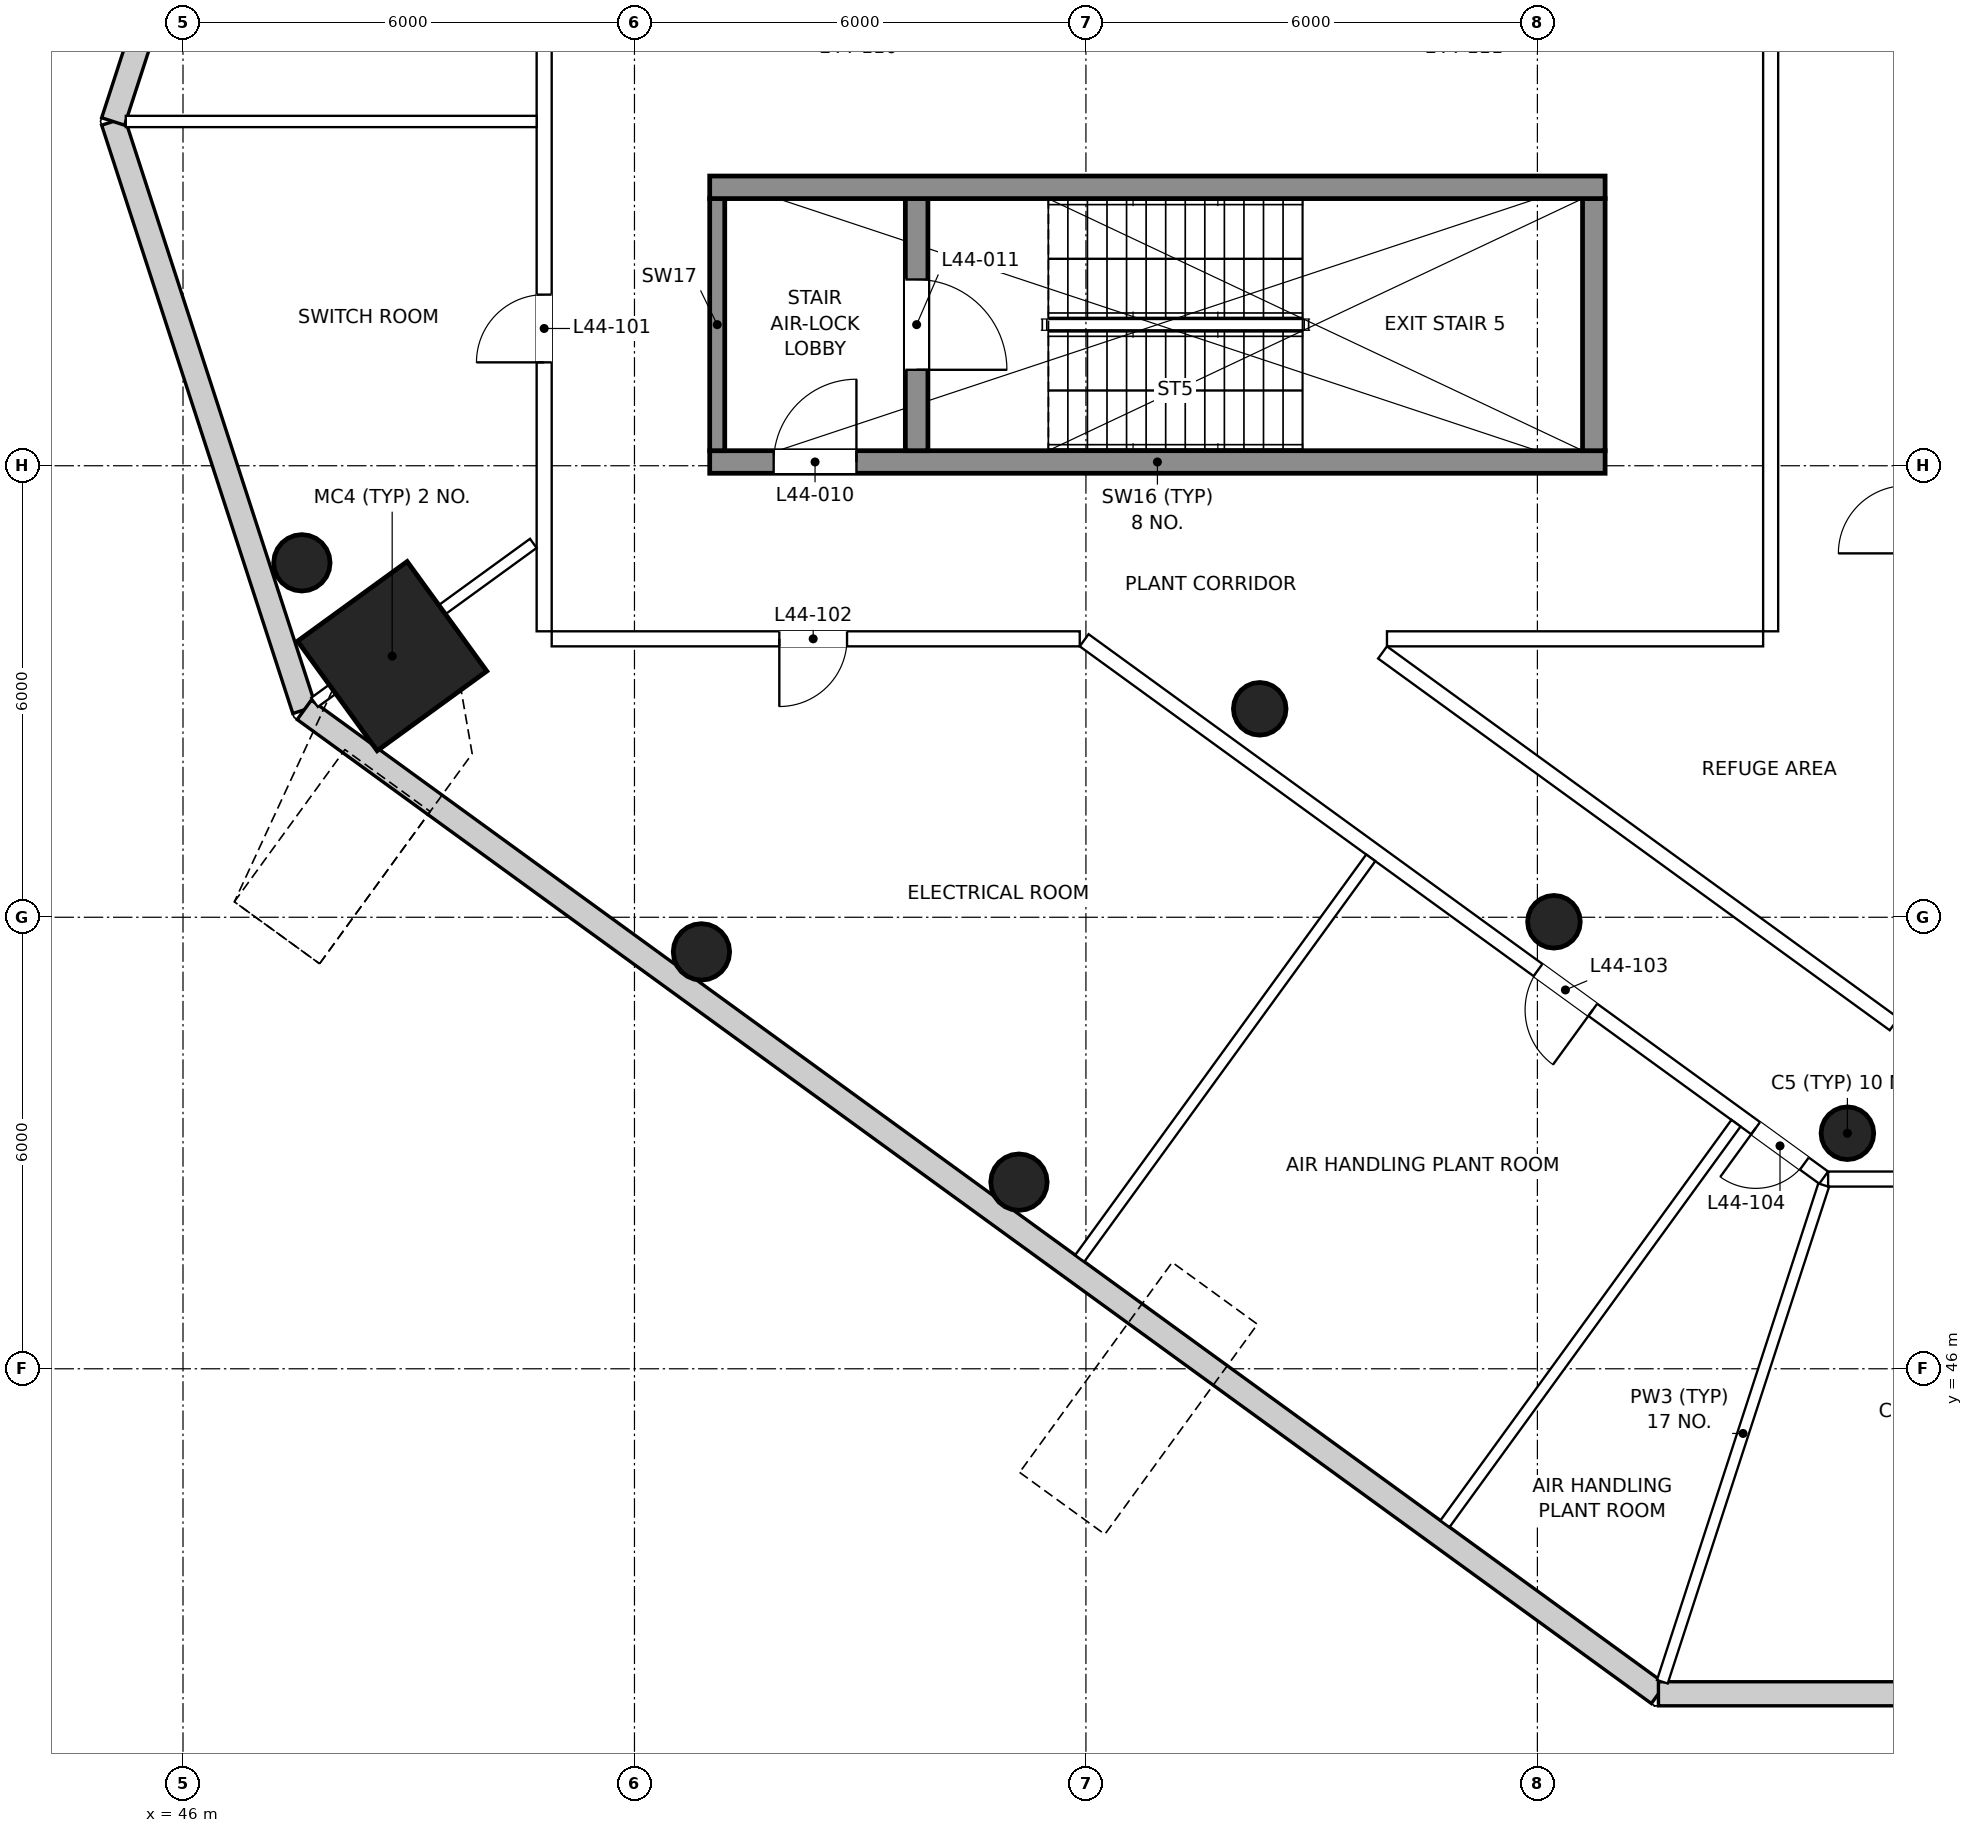
"""IFC4 building model, lengths in metres.
Left out: names, types, materials, properties, quantities, classifications, styles, units other than length and angle.
Written with IfcOpenShell. Run it as: python <this file> out.ifc"""

import sys

from ifc_helpers import new_model, si_unit, direction, frame, frame_2d, origin, origin_2d, place, context, subcontext, project, spatial, rectangle, circle, extrude, element, fill, save


model = new_model("IFC4")
c1 = context("Model", 3, precision=1e-05, world=origin(), true_north=direction((0.0, 1.0)))
c2 = subcontext(c1, "Body", "Model", "MODEL_VIEW")
j1 = project(units=[si_unit("LENGTHUNIT", "METRE"), si_unit("PLANEANGLEUNIT", "RADIAN")], contexts=[c1])
p1 = place(None, origin())
s1 = spatial("IfcSite", under=j1, at=p1, CompositionType="ELEMENT")
p2 = place(p1, origin())
s2 = spatial("IfcBuilding", under=s1, at=p2, CompositionType="ELEMENT")
p3 = place(p2, frame((0.0, 0.0, 191.5)))
s3 = spatial("IfcBuildingStorey", under=s2, at=p3, CompositionType="ELEMENT", Elevation=191.5)
p4 = place(p3, frame((47.58, 56.71, 0.0), z_axis=(0.0, 0.0, 1.0), x_axis=(1.0, 0.0, 0.0)))
e1 = element("IfcColumn", 1, at=p4, inside=s3, PredefinedType="COLUMN", context=c2, shape_type="SweptSolid", body=[
    extrude(circle(Radius=0.375, at=origin_2d()), origin(), (0.0, 0.0, 1.0), 5.0),
])
p5 = place(p3, frame((48.78, 55.47, 0.0), z_axis=(0.0, 0.0, 1.0), x_axis=(-0.809016994375, -0.587785252292, 0.0)))
e2 = element("IfcColumn", 2, at=p5, inside=s3, PredefinedType="COLUMN", context=c2, shape_type="SweptSolid", body=[
    extrude(rectangle(XDim=1.8, YDim=1.8, at=origin_2d()), origin(), (0.0, 0.0, 1.0), 5.0),
])
for number, where, z_axis, x_axis in (
    (3, (52.89, 51.54, 0.0), (0.0, 0.0, 1.0), (1.0, 0.0, 0.0)),
    (4, (57.11, 48.48, 0.0), (0.0, 0.0, 1.0), (1.0, 0.0, 0.0)),
):
    element("IfcColumn", number, at=place(p3, frame(where, z_axis=z_axis, x_axis=x_axis)), inside=s3, PredefinedType="COLUMN", context=c2, shape_type="SweptSolid", body=[
        extrude(circle(Radius=0.375, at=origin_2d()), origin(), (0.0, 0.0, 1.0), 5.0),
    ])
for number, where, z_axis, x_axis in (
    (5, (60.31, 54.77, 0.0), (0.0, 0.0, 1.0), (1.0, 0.0, 0.0)),
    (6, (64.22, 51.94, 0.0), (0.0, 0.0, 1.0), (1.0, 0.0, 0.0)),
    (7, (68.12, 49.13, 0.0), (0.0, 0.0, 1.0), (1.0, 0.0, 0.0)),
):
    element("IfcColumn", number, at=place(p3, frame(where, z_axis=z_axis, x_axis=x_axis)), inside=s3, PredefinedType="COLUMN", context=c2, shape_type="SweptSolid", body=[
        extrude(circle(Radius=0.35, at=origin_2d()), origin(), (0.0, 0.0, 1.0), 5.0),
    ])
p6 = place(p3, frame((45.071, 62.575, 0.0), z_axis=(0.0, 0.0, 1.0), x_axis=(0.30901958848, -0.951055673415, 0.0)))
e8 = element("IfcWall", 8, at=p6, inside=s3, PredefinedType="SOLIDWALL", context=c2, shape_type="SweptSolid", body=[
    extrude(rectangle(XDim=8.22, YDim=0.32, at=frame_2d((4.11, 0.0))), origin(), (0.0, 0.0, 1.0), 4.7),
])
p7 = place(p3, frame((47.612, 54.757, 0.0), z_axis=(0.0, 0.0, 1.0), x_axis=(0.809015997552, -0.5877866243, 0.0)))
e9 = element("IfcWall", 9, at=p7, inside=s3, PredefinedType="SOLIDWALL", context=c2, shape_type="SweptSolid", body=[
    extrude(rectangle(XDim=22.246, YDim=0.32, at=frame_2d((11.123, 0.0))), origin(), (0.0, 0.0, 1.0), 4.7),
])
p8 = place(p3, frame((65.609, 41.681, 0.0), z_axis=(0.0, 0.0, 1.0), x_axis=(1.0, 0.0, 0.0)))
e10 = element("IfcWall", 10, at=p8, inside=s3, PredefinedType="SOLIDWALL", context=c2, shape_type="SweptSolid", body=[
    extrude(rectangle(XDim=8.783, YDim=0.32, at=frame_2d((4.391, 0.0))), origin(), (0.0, 0.0, 1.0), 4.7),
])
p9 = place(p3, frame((51.632, 82.767, 0.0), z_axis=(0.0, 0.0, 1.0), x_axis=(-0.309022366866, -0.95105477065, 0.0)))
e11 = element("IfcWall", 11, at=p9, inside=s3, PredefinedType="SOLIDWALL", context=c2, shape_type="SweptSolid", body=[
    extrude(rectangle(XDim=21.231, YDim=0.32, at=frame_2d((10.615, 0.0))), origin(), (0.0, 0.0, 1.0), 4.7),
])
p10 = place(p3, frame((53.0, 58.05, 0.0), z_axis=(0.0, 0.0, 1.0), x_axis=(1.0, 0.0, 0.0)))
e12 = element("IfcWall", 12, at=p10, inside=s3, PredefinedType="SHEAR", context=c2, shape_type="SweptSolid", body=[
    extrude(rectangle(XDim=11.9, YDim=0.3, at=frame_2d((5.95, 0.0))), origin(), (0.0, 0.0, 1.0), 5.0),
])
p11 = place(p10, frame((0.85, 0.0, 0.0)))
e13 = element("IfcOpeningElement", 13, at=p11, cuts=e12, PredefinedType="OPENING", context=c2, shape_type="SweptSolid", body=[
    extrude(rectangle(XDim=1.1, YDim=2.1, at=frame_2d((0.55, 1.05))), frame((0.0, 0.16, 0.0), z_axis=(0.0, -1.0, 0.0), x_axis=(1.0, 0.0, 0.0)), (0.0, 0.0, 1.0), 0.32),
])
p12 = place(p3, frame((53.1, 58.2, 0.0), z_axis=(0.0, 0.0, 1.0), x_axis=(0.0, 1.0, 0.0)))
e14 = element("IfcWall", 14, at=p12, inside=s3, PredefinedType="SHEAR", context=c2, shape_type="SweptSolid", body=[
    extrude(rectangle(XDim=3.35, YDim=0.2, at=frame_2d((1.675, 0.0))), origin(), (0.0, 0.0, 1.0), 5.0),
])
p13 = place(p3, frame((55.75, 58.2, 0.0), z_axis=(0.0, 0.0, 1.0), x_axis=(0.0, 1.0, 0.0)))
e15 = element("IfcWall", 15, at=p13, inside=s3, PredefinedType="SHEAR", context=c2, shape_type="SweptSolid", body=[
    extrude(rectangle(XDim=3.35, YDim=0.3, at=frame_2d((1.675, 0.0))), origin(), (0.0, 0.0, 1.0), 5.0),
])
p14 = place(p13, frame((1.075, 0.0, 0.0)))
e16 = element("IfcOpeningElement", 16, at=p14, cuts=e15, PredefinedType="OPENING", context=c2, shape_type="SweptSolid", body=[
    extrude(rectangle(XDim=1.2, YDim=2.1, at=frame_2d((0.6, 1.05))), frame((0.0, 0.16, 0.0), z_axis=(0.0, -1.0, 0.0), x_axis=(1.0, 0.0, 0.0)), (0.0, 0.0, 1.0), 0.32),
])
p15 = place(p3, frame((64.75, 58.2, 0.0), z_axis=(0.0, 0.0, 1.0), x_axis=(0.0, 1.0, 0.0)))
e17 = element("IfcWall", 17, at=p15, inside=s3, PredefinedType="SHEAR", context=c2, shape_type="SweptSolid", body=[
    extrude(rectangle(XDim=3.35, YDim=0.3, at=frame_2d((1.675, 0.0))), origin(), (0.0, 0.0, 1.0), 5.0),
])
p16 = place(p3, frame((53.0, 61.7, 0.0), z_axis=(0.0, 0.0, 1.0), x_axis=(1.0, 0.0, 0.0)))
e18 = element("IfcWall", 18, at=p16, inside=s3, PredefinedType="SHEAR", context=c2, shape_type="SweptSolid", body=[
    extrude(rectangle(XDim=11.9, YDim=0.3, at=frame_2d((5.95, 0.0))), origin(), (0.0, 0.0, 1.0), 5.0),
])
p17 = place(p3, frame((72.136, 48.521, 0.0), z_axis=(0.0, 0.0, 1.0), x_axis=(-1.0, 0.0, 0.0)))
e19 = element("IfcWall", 19, at=p17, inside=s3, PredefinedType="PARTITIONING", context=c2, shape_type="SweptSolid", body=[
    extrude(rectangle(XDim=4.272, YDim=0.2, at=frame_2d((2.136, 0.0))), origin(), (0.0, 0.0, 1.0), 3.7),
])
p18 = place(p17, frame((1.686, 0.0, 0.0)))
e20 = element("IfcOpeningElement", 20, at=p18, cuts=e19, PredefinedType="OPENING", context=c2, shape_type="SweptSolid", body=[
    extrude(rectangle(XDim=0.9, YDim=2.1, at=frame_2d((0.45, 1.05))), frame((0.0, 0.11, 0.0), z_axis=(0.0, -1.0, 0.0), x_axis=(1.0, 0.0, 0.0)), (0.0, 0.0, 1.0), 0.22),
])
p19 = place(p3, frame((67.805, 48.54, 0.0), z_axis=(0.0, 0.0, 1.0), x_axis=(-0.809021032416, 0.587779694366, 0.0)))
e21 = element("IfcWall", 21, at=p19, inside=s3, PredefinedType="PARTITIONING", context=c2, shape_type="SweptSolid", body=[
    extrude(rectangle(XDim=12.148, YDim=0.2, at=frame_2d((6.074, 0.0))), origin(), (0.0, 0.0, 1.0), 3.7),
])
p20 = place(p19, frame((3.793, 0.0, 0.0)))
e22 = element("IfcOpeningElement", 22, at=p20, cuts=e21, PredefinedType="OPENING", context=c2, shape_type="SweptSolid", body=[
    extrude(rectangle(XDim=0.9, YDim=2.1, at=frame_2d((0.45, 1.05))), frame((0.0, 0.11, 0.0), z_axis=(0.0, -1.0, 0.0), x_axis=(1.0, 0.0, 0.0)), (0.0, 0.0, 1.0), 0.22),
])
p21 = place(p19, frame((0.318, 0.0, 0.0)))
e23 = element("IfcOpeningElement", 23, at=p21, cuts=e21, PredefinedType="OPENING", context=c2, shape_type="SweptSolid", body=[
    extrude(rectangle(XDim=0.8, YDim=2.1, at=frame_2d((0.4, 1.05))), frame((0.0, 0.11, 0.0), z_axis=(0.0, -1.0, 0.0), x_axis=(1.0, 0.0, 0.0)), (0.0, 0.0, 1.0), 0.22),
])
p22 = place(p3, frame((57.918, 55.7, 0.0), z_axis=(0.0, 0.0, 1.0), x_axis=(-1.0, 0.0, 0.0)))
e24 = element("IfcWall", 24, at=p22, inside=s3, PredefinedType="PARTITIONING", context=c2, shape_type="SweptSolid", body=[
    extrude(rectangle(XDim=7.018, YDim=0.2, at=frame_2d((3.509, 0.0))), origin(), (0.0, 0.0, 1.0), 4.25),
])
p23 = place(p22, frame((3.093, 0.0, 0.0)))
e25 = element("IfcOpeningElement", 25, at=p23, cuts=e24, PredefinedType="OPENING", context=c2, shape_type="SweptSolid", body=[
    extrude(rectangle(XDim=0.9, YDim=2.1, at=frame_2d((0.45, 1.05))), frame((0.0, 0.11, 0.0), z_axis=(0.0, -1.0, 0.0), x_axis=(1.0, 0.0, 0.0)), (0.0, 0.0, 1.0), 0.22),
])
p24 = place(p3, frame((50.8, 55.8, 0.0), z_axis=(0.0, 0.0, 1.0), x_axis=(0.0, 1.0, 0.0)))
e26 = element("IfcWall", 26, at=p24, inside=s3, PredefinedType="PARTITIONING", context=c2, shape_type="SweptSolid", body=[
    extrude(rectangle(XDim=8.35, YDim=0.2, at=frame_2d((4.175, 0.0))), origin(), (0.0, 0.0, 1.0), 4.25),
])
p25 = place(p24, frame((3.574, 0.0, 0.0)))
e27 = element("IfcOpeningElement", 27, at=p25, cuts=e26, PredefinedType="OPENING", context=c2, shape_type="SweptSolid", body=[
    extrude(rectangle(XDim=0.9, YDim=2.1, at=frame_2d((0.45, 1.05))), frame((0.0, 0.11, 0.0), z_axis=(0.0, -1.0, 0.0), x_axis=(1.0, 0.0, 0.0)), (0.0, 0.0, 1.0), 0.22),
])
p26 = place(p3, frame((67.1, 64.15, 0.0), z_axis=(0.0, 0.0, 1.0), x_axis=(0.0, -1.0, 0.0)))
e28 = element("IfcWall", 28, at=p26, inside=s3, PredefinedType="PARTITIONING", context=c2, shape_type="SweptSolid", body=[
    extrude(rectangle(XDim=8.35, YDim=0.2, at=frame_2d((4.175, 0.0))), origin(), (0.0, 0.0, 1.0), 3.7),
])
p27 = place(p3, frame((67.0, 55.7, 0.0), z_axis=(0.0, 0.0, 1.0), x_axis=(-1.0, 0.0, 0.0)))
e29 = element("IfcWall", 29, at=p27, inside=s3, PredefinedType="PARTITIONING", context=c2, shape_type="SweptSolid", body=[
    extrude(rectangle(XDim=4.999, YDim=0.2, at=frame_2d((2.5, 0.0))), origin(), (0.0, 0.0, 1.0), 3.7),
])
p28 = place(p3, frame((61.942, 55.519, 0.0), z_axis=(0.0, 0.0, 1.0), x_axis=(0.809023664715, -0.587776071248, 0.0)))
e30 = element("IfcWall", 30, at=p28, inside=s3, PredefinedType="PARTITIONING", context=c2, shape_type="SweptSolid", body=[
    extrude(rectangle(XDim=8.404, YDim=0.2, at=frame_2d((4.202, 0.0))), origin(), (0.0, 0.0, 1.0), 3.7),
])
p29 = place(p3, frame((45.24, 62.575, 0.0), z_axis=(0.0, 0.0, 1.0), x_axis=(1.0, 0.0, 0.0)))
e31 = element("IfcWall", 31, at=p29, inside=s3, PredefinedType="PARTITIONING", context=c2, shape_type="SweptSolid", body=[
    extrude(rectangle(XDim=5.46, YDim=0.15, at=frame_2d((2.73, 0.0))), origin(), (0.0, 0.0, 1.0), 4.0),
])
p30 = place(p3, frame((47.748, 54.856, 0.0), z_axis=(0.0, 0.0, 1.0), x_axis=(0.809035551496, 0.587759709759, 0.0)))
e32 = element("IfcWall", 32, at=p30, inside=s3, PredefinedType="PARTITIONING", context=c2, shape_type="SweptSolid", body=[
    extrude(rectangle(XDim=3.595, YDim=0.15, at=frame_2d((1.797, 0.0))), origin(), (0.0, 0.0, 1.0), 3.7),
])
p31 = place(p3, frame((65.661, 41.841, 0.0), z_axis=(0.0, 0.0, 1.0), x_axis=(0.309030380362, 0.95105216682, 0.0)))
e33 = element("IfcWall", 33, at=p31, inside=s3, PredefinedType="PARTITIONING", context=c2, shape_type="SweptSolid", body=[
    extrude(rectangle(XDim=6.939, YDim=0.15, at=frame_2d((3.469, 0.0))), origin(), (0.0, 0.0, 1.0), 4.7),
])
p32 = place(p3, frame((57.918, 47.467, 0.0), z_axis=(0.0, 0.0, 1.0), x_axis=(0.587796586364, 0.809008759569, 0.0)))
e34 = element("IfcWall", 34, at=p32, inside=s3, PredefinedType="PARTITIONING", context=c2, shape_type="SweptSolid", body=[
    extrude(rectangle(XDim=6.58, YDim=0.15, at=frame_2d((3.29, 0.0))), origin(), (0.0, 0.0, 1.0), 4.7),
])
p33 = place(p3, frame((62.772, 43.94, 0.0), z_axis=(0.0, 0.0, 1.0), x_axis=(0.587772301387, 0.8090264036, 0.0)))
e35 = element("IfcWall", 35, at=p33, inside=s3, PredefinedType="PARTITIONING", context=c2, shape_type="SweptSolid", body=[
    extrude(rectangle(XDim=6.58, YDim=0.15, at=frame_2d((3.29, 0.0))), origin(), (0.0, 0.0, 1.0), 4.7),
])
p34 = place(p11, origin())
e36 = element("IfcDoor", 36, at=p34, inside=s3, OperationType="SINGLE_SWING_RIGHT", PredefinedType="DOOR", context=c2, shape_type="SweptSolid", body=[
    extrude(rectangle(XDim=1.1, YDim=2.1, at=frame_2d((0.55, 1.05))), frame((0.0, 0.025, 0.0), z_axis=(0.0, -1.0, 0.0), x_axis=(1.0, 0.0, 0.0)), (0.0, 0.0, 1.0), 0.05),
])
fill(e13, e36)
p35 = place(p14, frame((1.2, 0.0, 0.0), z_axis=(0.0, 0.0, 1.0), x_axis=(-1.0, 0.0, 0.0)))
e37 = element("IfcDoor", 37, at=p35, inside=s3, OperationType="SINGLE_SWING_RIGHT", PredefinedType="DOOR", context=c2, shape_type="SweptSolid", body=[
    extrude(rectangle(XDim=1.2, YDim=2.1, at=frame_2d((0.6, 1.05))), frame((0.0, 0.025, 0.0), z_axis=(0.0, -1.0, 0.0), x_axis=(1.0, 0.0, 0.0)), (0.0, 0.0, 1.0), 0.05),
])
fill(e16, e37)
p36 = place(p25, origin())
e38 = element("IfcDoor", 38, at=p36, inside=s3, OperationType="SINGLE_SWING_LEFT", PredefinedType="DOOR", context=c2, shape_type="SweptSolid", body=[
    extrude(rectangle(XDim=0.9, YDim=2.1, at=frame_2d((0.45, 1.05))), frame((0.0, 0.025, 0.0), z_axis=(0.0, -1.0, 0.0), x_axis=(1.0, 0.0, 0.0)), (0.0, 0.0, 1.0), 0.05),
])
fill(e27, e38)
p37 = place(p23, origin())
e39 = element("IfcDoor", 39, at=p37, inside=s3, OperationType="SINGLE_SWING_RIGHT", PredefinedType="DOOR", context=c2, shape_type="SweptSolid", body=[
    extrude(rectangle(XDim=0.9, YDim=2.1, at=frame_2d((0.45, 1.05))), frame((0.0, 0.025, 0.0), z_axis=(0.0, -1.0, 0.0), x_axis=(1.0, 0.0, 0.0)), (0.0, 0.0, 1.0), 0.05),
])
fill(e25, e39)
p38 = place(p20, origin())
e40 = element("IfcDoor", 40, at=p38, inside=s3, OperationType="SINGLE_SWING_LEFT", PredefinedType="DOOR", context=c2, shape_type="SweptSolid", body=[
    extrude(rectangle(XDim=0.9, YDim=2.1, at=frame_2d((0.45, 1.05))), frame((0.0, 0.025, 0.0), z_axis=(0.0, -1.0, 0.0), x_axis=(1.0, 0.0, 0.0)), (0.0, 0.0, 1.0), 0.05),
])
fill(e22, e40)
p39 = place(p21, origin())
e41 = element("IfcDoor", 41, at=p39, inside=s3, OperationType="SINGLE_SWING_RIGHT", PredefinedType="DOOR", context=c2, shape_type="SweptSolid", body=[
    extrude(rectangle(XDim=0.8, YDim=2.1, at=frame_2d((0.4, 1.05))), frame((0.0, 0.025, 0.0), z_axis=(0.0, -1.0, 0.0), x_axis=(1.0, 0.0, 0.0)), (0.0, 0.0, 1.0), 0.05),
])
fill(e23, e41)
save(model, sys.argv[1])
